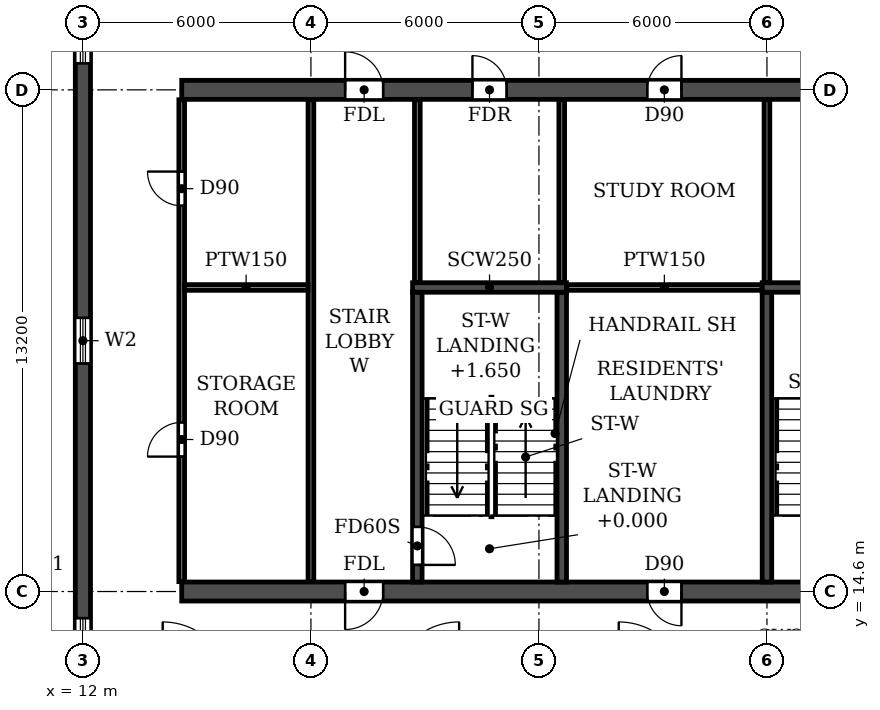
"""IFC4 building model, lengths in metres.
Left out: names, types, materials, properties, quantities, classifications, styles, units other than length and angle.
Written with IfcOpenShell. Run it as: python <this file> out.ifc"""

import sys

from ifc_helpers import new_model, si_unit, direction, frame, frame_2d, origin, place, context, subcontext, project, spatial, rectangle, extrude, element, fill, save


model = new_model("IFC4")
c1 = context("Model", 3, precision=1e-05, world=origin(), true_north=direction((0.0, 1.0)))
c2 = subcontext(c1, "Body", "Model", "MODEL_VIEW")
j1 = project(units=[si_unit("LENGTHUNIT", "METRE"), si_unit("PLANEANGLEUNIT", "RADIAN")], contexts=[c1])
p1 = place(None, origin())
s1 = spatial("IfcSite", under=j1, at=p1, CompositionType="ELEMENT")
p2 = place(p1, origin())
s2 = spatial("IfcBuilding", under=s1, at=p2, CompositionType="ELEMENT")
p3 = place(p2, frame((0.0, 0.0, 105.9)))
s3 = spatial("IfcBuildingStorey", under=s2, at=p3, CompositionType="ELEMENT", Elevation=105.9)
p4 = place(p3, frame((12.0, 4.683, 0.0), z_axis=(0.0, 0.0, 1.0), x_axis=(0.0, 1.0, 0.0)))
e1 = element("IfcWall", 1, at=p4, inside=s3, PredefinedType="SHEAR", context=c2, shape_type="SweptSolid", body=[
    extrude(rectangle(XDim=34.234, YDim=0.4, at=frame_2d((17.117, 0.0))), origin(), (0.0, 0.0, 1.0), 3.06),
])
p5 = place(p4, frame((23.817, 0.0, 0.9)))
e2 = element("IfcOpeningElement", 2, at=p5, cuts=e1, PredefinedType="OPENING", context=c2, shape_type="SweptSolid", body=[
    extrude(rectangle(XDim=1.2, YDim=1.5, at=frame_2d((0.6, 0.75))), frame((0.0, 0.21, 0.0), z_axis=(0.0, -1.0, 0.0), x_axis=(1.0, 0.0, 0.0)), (0.0, 0.0, 1.0), 0.42),
])
p6 = place(p4, frame((8.017, 0.0, 0.9)))
e3 = element("IfcOpeningElement", 3, at=p6, cuts=e1, PredefinedType="OPENING", context=c2, shape_type="SweptSolid", body=[
    extrude(rectangle(XDim=1.2, YDim=1.5, at=frame_2d((0.6, 0.75))), frame((0.0, 0.21, 0.0), z_axis=(0.0, -1.0, 0.0), x_axis=(1.0, 0.0, 0.0)), (0.0, 0.0, 1.0), 0.42),
])
p7 = place(p4, frame((15.917, 0.0, 0.9)))
e4 = element("IfcOpeningElement", 4, at=p7, cuts=e1, PredefinedType="OPENING", context=c2, shape_type="SweptSolid", body=[
    extrude(rectangle(XDim=1.2, YDim=1.5, at=frame_2d((0.6, 0.75))), frame((0.0, 0.21, 0.0), z_axis=(0.0, -1.0, 0.0), x_axis=(1.0, 0.0, 0.0)), (0.0, 0.0, 1.0), 0.42),
])
p8 = place(p4, frame((26.417, 0.0, 0.0)))
e5 = element("IfcOpeningElement", 5, at=p8, cuts=e1, PredefinedType="OPENING", context=c2, shape_type="SweptSolid", body=[
    extrude(rectangle(XDim=1.0, YDim=2.1, at=frame_2d((0.5, 1.05))), frame((0.0, 0.21, 0.0), z_axis=(0.0, -1.0, 0.0), x_axis=(1.0, 0.0, 0.0)), (0.0, 0.0, 1.0), 0.42),
])
p9 = place(p4, frame((3.159, 0.0, 0.0)))
e6 = element("IfcOpeningElement", 6, at=p9, cuts=e1, PredefinedType="OPENING", context=c2, shape_type="SweptSolid", body=[
    extrude(rectangle(XDim=1.0, YDim=2.1, at=frame_2d((0.5, 1.05))), frame((0.0, 0.21, 0.0), z_axis=(0.0, -1.0, 0.0), x_axis=(1.0, 0.0, 0.0)), (0.0, 0.0, 1.0), 0.42),
])
p10 = place(p3, frame((14.6, 14.6, 0.0), z_axis=(0.0, 0.0, 1.0), x_axis=(1.0, 0.0, 0.0)))
e7 = element("IfcWall", 7, at=p10, inside=s3, PredefinedType="SOLIDWALL", context=c2, shape_type="SweptSolid", body=[
    extrude(rectangle(XDim=72.8, YDim=0.5, at=frame_2d((36.4, 0.0))), origin(), (0.0, 0.0, 1.0), 3.06),
])
p11 = place(p10, frame((4.3, 0.0, 0.0)))
e8 = element("IfcOpeningElement", 8, at=p11, cuts=e7, PredefinedType="OPENING", context=c2, shape_type="SweptSolid", body=[
    extrude(rectangle(XDim=1.0, YDim=2.1, at=frame_2d((0.5, 1.05))), frame((0.0, 0.26, 0.0), z_axis=(0.0, -1.0, 0.0), x_axis=(1.0, 0.0, 0.0)), (0.0, 0.0, 1.0), 0.52),
])
p12 = place(p10, frame((12.25, 0.0, 0.0)))
e9 = element("IfcOpeningElement", 9, at=p12, cuts=e7, PredefinedType="OPENING", context=c2, shape_type="SweptSolid", body=[
    extrude(rectangle(XDim=0.9, YDim=2.1, at=frame_2d((0.45, 1.05))), frame((0.0, 0.26, 0.0), z_axis=(0.0, -1.0, 0.0), x_axis=(1.0, 0.0, 0.0)), (0.0, 0.0, 1.0), 0.52),
])
p13 = place(p10, frame((16.8, 0.0, 0.0)))
e10 = element("IfcOpeningElement", 10, at=p13, cuts=e7, PredefinedType="OPENING", context=c2, shape_type="SweptSolid", body=[
    extrude(rectangle(XDim=1.0, YDim=2.1, at=frame_2d((0.5, 1.05))), frame((0.0, 0.26, 0.0), z_axis=(0.0, -1.0, 0.0), x_axis=(1.0, 0.0, 0.0)), (0.0, 0.0, 1.0), 0.52),
])
p14 = place(p10, frame((30.7, 0.0, 0.0)))
e11 = element("IfcOpeningElement", 11, at=p14, cuts=e7, PredefinedType="OPENING", context=c2, shape_type="SweptSolid", body=[
    extrude(rectangle(XDim=1.0, YDim=2.1, at=frame_2d((0.5, 1.05))), frame((0.0, 0.26, 0.0), z_axis=(0.0, -1.0, 0.0), x_axis=(1.0, 0.0, 0.0)), (0.0, 0.0, 1.0), 0.52),
])
p15 = place(p10, frame((35.9, 0.0, 0.0)))
e12 = element("IfcOpeningElement", 12, at=p15, cuts=e7, PredefinedType="OPENING", context=c2, shape_type="SweptSolid", body=[
    extrude(rectangle(XDim=1.0, YDim=2.1, at=frame_2d((0.5, 1.05))), frame((0.0, 0.26, 0.0), z_axis=(0.0, -1.0, 0.0), x_axis=(1.0, 0.0, 0.0)), (0.0, 0.0, 1.0), 0.52),
])
p16 = place(p10, frame((39.8, 0.0, 0.0)))
e13 = element("IfcOpeningElement", 13, at=p16, cuts=e7, PredefinedType="OPENING", context=c2, shape_type="SweptSolid", body=[
    extrude(rectangle(XDim=1.0, YDim=2.1, at=frame_2d((0.5, 1.05))), frame((0.0, 0.26, 0.0), z_axis=(0.0, -1.0, 0.0), x_axis=(1.0, 0.0, 0.0)), (0.0, 0.0, 1.0), 0.52),
])
p17 = place(p10, frame((43.7, 0.0, 0.0)))
e14 = element("IfcOpeningElement", 14, at=p17, cuts=e7, PredefinedType="OPENING", context=c2, shape_type="SweptSolid", body=[
    extrude(rectangle(XDim=1.0, YDim=2.1, at=frame_2d((0.5, 1.05))), frame((0.0, 0.26, 0.0), z_axis=(0.0, -1.0, 0.0), x_axis=(1.0, 0.0, 0.0)), (0.0, 0.0, 1.0), 0.52),
])
p18 = place(p10, frame((55.0, 0.0, 0.0)))
e15 = element("IfcOpeningElement", 15, at=p18, cuts=e7, PredefinedType="OPENING", context=c2, shape_type="SweptSolid", body=[
    extrude(rectangle(XDim=1.0, YDim=2.1, at=frame_2d((0.5, 1.05))), frame((0.0, 0.26, 0.0), z_axis=(0.0, -1.0, 0.0), x_axis=(1.0, 0.0, 0.0)), (0.0, 0.0, 1.0), 0.52),
])
p19 = place(p10, frame((59.65, 0.0, 0.0)))
e16 = element("IfcOpeningElement", 16, at=p19, cuts=e7, PredefinedType="OPENING", context=c2, shape_type="SweptSolid", body=[
    extrude(rectangle(XDim=0.9, YDim=2.1, at=frame_2d((0.45, 1.05))), frame((0.0, 0.26, 0.0), z_axis=(0.0, -1.0, 0.0), x_axis=(1.0, 0.0, 0.0)), (0.0, 0.0, 1.0), 0.52),
])
p20 = place(p10, frame((67.5, 0.0, 0.0)))
e17 = element("IfcOpeningElement", 17, at=p20, cuts=e7, PredefinedType="OPENING", context=c2, shape_type="SweptSolid", body=[
    extrude(rectangle(XDim=1.0, YDim=2.1, at=frame_2d((0.5, 1.05))), frame((0.0, 0.26, 0.0), z_axis=(0.0, -1.0, 0.0), x_axis=(1.0, 0.0, 0.0)), (0.0, 0.0, 1.0), 0.52),
])
p21 = place(p3, frame((14.6, 27.8, 0.0), z_axis=(0.0, 0.0, 1.0), x_axis=(1.0, 0.0, 0.0)))
e18 = element("IfcWall", 18, at=p21, inside=s3, PredefinedType="SOLIDWALL", context=c2, shape_type="SweptSolid", body=[
    extrude(rectangle(XDim=72.8, YDim=0.5, at=frame_2d((36.4, 0.0))), origin(), (0.0, 0.0, 1.0), 3.06),
])
p22 = place(p21, frame((4.3, 0.0, 0.0)))
e19 = element("IfcOpeningElement", 19, at=p22, cuts=e18, PredefinedType="OPENING", context=c2, shape_type="SweptSolid", body=[
    extrude(rectangle(XDim=1.0, YDim=2.1, at=frame_2d((0.5, 1.05))), frame((0.0, 0.26, 0.0), z_axis=(0.0, -1.0, 0.0), x_axis=(1.0, 0.0, 0.0)), (0.0, 0.0, 1.0), 0.52),
])
p23 = place(p21, frame((7.65, 0.0, 0.0)))
e20 = element("IfcOpeningElement", 20, at=p23, cuts=e18, PredefinedType="OPENING", context=c2, shape_type="SweptSolid", body=[
    extrude(rectangle(XDim=0.9, YDim=2.1, at=frame_2d((0.45, 1.05))), frame((0.0, 0.26, 0.0), z_axis=(0.0, -1.0, 0.0), x_axis=(1.0, 0.0, 0.0)), (0.0, 0.0, 1.0), 0.52),
])
p24 = place(p21, frame((12.25, 0.0, 0.0)))
e21 = element("IfcOpeningElement", 21, at=p24, cuts=e18, PredefinedType="OPENING", context=c2, shape_type="SweptSolid", body=[
    extrude(rectangle(XDim=0.9, YDim=2.1, at=frame_2d((0.45, 1.05))), frame((0.0, 0.26, 0.0), z_axis=(0.0, -1.0, 0.0), x_axis=(1.0, 0.0, 0.0)), (0.0, 0.0, 1.0), 0.52),
])
p25 = place(p21, frame((16.85, 0.0, 0.0)))
e22 = element("IfcOpeningElement", 22, at=p25, cuts=e18, PredefinedType="OPENING", context=c2, shape_type="SweptSolid", body=[
    extrude(rectangle(XDim=0.9, YDim=2.1, at=frame_2d((0.45, 1.05))), frame((0.0, 0.26, 0.0), z_axis=(0.0, -1.0, 0.0), x_axis=(1.0, 0.0, 0.0)), (0.0, 0.0, 1.0), 0.52),
])
p26 = place(p21, frame((21.3, 0.0, 0.0)))
e23 = element("IfcOpeningElement", 23, at=p26, cuts=e18, PredefinedType="OPENING", context=c2, shape_type="SweptSolid", body=[
    extrude(rectangle(XDim=1.0, YDim=2.1, at=frame_2d((0.5, 1.05))), frame((0.0, 0.26, 0.0), z_axis=(0.0, -1.0, 0.0), x_axis=(1.0, 0.0, 0.0)), (0.0, 0.0, 1.0), 0.52),
])
p27 = place(p21, frame((26.25, 0.0, 0.0)))
e24 = element("IfcOpeningElement", 24, at=p27, cuts=e18, PredefinedType="OPENING", context=c2, shape_type="SweptSolid", body=[
    extrude(rectangle(XDim=1.5, YDim=2.1, at=frame_2d((0.75, 1.05))), frame((0.0, 0.26, 0.0), z_axis=(0.0, -1.0, 0.0), x_axis=(1.0, 0.0, 0.0)), (0.0, 0.0, 1.0), 0.52),
])
p28 = place(p21, frame((33.0, 0.0, 0.0)))
e25 = element("IfcOpeningElement", 25, at=p28, cuts=e18, PredefinedType="OPENING", context=c2, shape_type="SweptSolid", body=[
    extrude(rectangle(XDim=1.0, YDim=2.1, at=frame_2d((0.5, 1.05))), frame((0.0, 0.26, 0.0), z_axis=(0.0, -1.0, 0.0), x_axis=(1.0, 0.0, 0.0)), (0.0, 0.0, 1.0), 0.52),
])
p29 = place(p21, frame((35.9, 0.0, 0.0)))
e26 = element("IfcOpeningElement", 26, at=p29, cuts=e18, PredefinedType="OPENING", context=c2, shape_type="SweptSolid", body=[
    extrude(rectangle(XDim=1.0, YDim=2.1, at=frame_2d((0.5, 1.05))), frame((0.0, 0.26, 0.0), z_axis=(0.0, -1.0, 0.0), x_axis=(1.0, 0.0, 0.0)), (0.0, 0.0, 1.0), 0.52),
])
p30 = place(p21, frame((40.1, 0.0, 0.0)))
e27 = element("IfcOpeningElement", 27, at=p30, cuts=e18, PredefinedType="OPENING", context=c2, shape_type="SweptSolid", body=[
    extrude(rectangle(XDim=1.0, YDim=2.1, at=frame_2d((0.5, 1.05))), frame((0.0, 0.26, 0.0), z_axis=(0.0, -1.0, 0.0), x_axis=(1.0, 0.0, 0.0)), (0.0, 0.0, 1.0), 0.52),
])
p31 = place(p21, frame((44.0, 0.0, 0.0)))
e28 = element("IfcOpeningElement", 28, at=p31, cuts=e18, PredefinedType="OPENING", context=c2, shape_type="SweptSolid", body=[
    extrude(rectangle(XDim=1.0, YDim=2.1, at=frame_2d((0.5, 1.05))), frame((0.0, 0.26, 0.0), z_axis=(0.0, -1.0, 0.0), x_axis=(1.0, 0.0, 0.0)), (0.0, 0.0, 1.0), 0.52),
])
p32 = place(p21, frame((49.2, 0.0, 0.0)))
e29 = element("IfcOpeningElement", 29, at=p32, cuts=e18, PredefinedType="OPENING", context=c2, shape_type="SweptSolid", body=[
    extrude(rectangle(XDim=1.0, YDim=2.1, at=frame_2d((0.5, 1.05))), frame((0.0, 0.26, 0.0), z_axis=(0.0, -1.0, 0.0), x_axis=(1.0, 0.0, 0.0)), (0.0, 0.0, 1.0), 0.52),
])
p33 = place(p21, frame((55.05, 0.0, 0.0)))
e30 = element("IfcOpeningElement", 30, at=p33, cuts=e18, PredefinedType="OPENING", context=c2, shape_type="SweptSolid", body=[
    extrude(rectangle(XDim=0.9, YDim=2.1, at=frame_2d((0.45, 1.05))), frame((0.0, 0.26, 0.0), z_axis=(0.0, -1.0, 0.0), x_axis=(1.0, 0.0, 0.0)), (0.0, 0.0, 1.0), 0.52),
])
p34 = place(p21, frame((59.65, 0.0, 0.0)))
e31 = element("IfcOpeningElement", 31, at=p34, cuts=e18, PredefinedType="OPENING", context=c2, shape_type="SweptSolid", body=[
    extrude(rectangle(XDim=0.9, YDim=2.1, at=frame_2d((0.45, 1.05))), frame((0.0, 0.26, 0.0), z_axis=(0.0, -1.0, 0.0), x_axis=(1.0, 0.0, 0.0)), (0.0, 0.0, 1.0), 0.52),
])
p35 = place(p21, frame((64.25, 0.0, 0.0)))
e32 = element("IfcOpeningElement", 32, at=p35, cuts=e18, PredefinedType="OPENING", context=c2, shape_type="SweptSolid", body=[
    extrude(rectangle(XDim=0.9, YDim=2.1, at=frame_2d((0.45, 1.05))), frame((0.0, 0.26, 0.0), z_axis=(0.0, -1.0, 0.0), x_axis=(1.0, 0.0, 0.0)), (0.0, 0.0, 1.0), 0.52),
])
p36 = place(p21, frame((67.5, 0.0, 0.0)))
e33 = element("IfcOpeningElement", 33, at=p36, cuts=e18, PredefinedType="OPENING", context=c2, shape_type="SweptSolid", body=[
    extrude(rectangle(XDim=1.0, YDim=2.1, at=frame_2d((0.5, 1.05))), frame((0.0, 0.26, 0.0), z_axis=(0.0, -1.0, 0.0), x_axis=(1.0, 0.0, 0.0)), (0.0, 0.0, 1.0), 0.52),
])
p37 = place(p3, frame((30.0, 14.85, 0.0), z_axis=(0.0, 0.0, 1.0), x_axis=(0.0, 1.0, 0.0)))
e34 = element("IfcWall", 34, at=p37, inside=s3, PredefinedType="SOLIDWALL", context=c2, shape_type="SweptSolid", body=[
    extrude(rectangle(XDim=7.625, YDim=0.25, at=frame_2d((3.812, 0.0))), origin(), (0.0, 0.0, 1.0), 3.06),
])
p38 = place(p3, frame((29.875, 22.6, 0.0), z_axis=(0.0, 0.0, 1.0), x_axis=(1.0, 0.0, 0.0)))
e35 = element("IfcWall", 35, at=p38, inside=s3, PredefinedType="SOLIDWALL", context=c2, shape_type="SweptSolid", body=[
    extrude(rectangle(XDim=4.05, YDim=0.25, at=frame_2d((2.025, 0.0))), origin(), (0.0, 0.0, 1.0), 3.06),
])
p39 = place(p3, frame((20.8, 14.85, 0.0), z_axis=(0.0, 0.0, 1.0), x_axis=(0.0, 1.0, 0.0)))
e36 = element("IfcWall", 36, at=p39, inside=s3, PredefinedType="SOLIDWALL", context=c2, shape_type="SweptSolid", body=[
    extrude(rectangle(XDim=7.625, YDim=0.25, at=frame_2d((3.812, 0.0))), origin(), (0.0, 0.0, 1.0), 3.06),
])
p40 = place(p39, frame((0.45, 0.0, 0.0)))
e37 = element("IfcOpeningElement", 37, at=p40, cuts=e36, PredefinedType="OPENING", context=c2, shape_type="SweptSolid", body=[
    extrude(rectangle(XDim=1.0, YDim=2.1, at=frame_2d((0.5, 1.05))), frame((0.0, 0.135, 0.0), z_axis=(0.0, -1.0, 0.0), x_axis=(1.0, 0.0, 0.0)), (0.0, 0.0, 1.0), 0.27),
])
p41 = place(p3, frame((24.6, 14.85, 0.0), z_axis=(0.0, 0.0, 1.0), x_axis=(0.0, 1.0, 0.0)))
e38 = element("IfcWall", 38, at=p41, inside=s3, PredefinedType="SOLIDWALL", context=c2, shape_type="SweptSolid", body=[
    extrude(rectangle(XDim=7.625, YDim=0.25, at=frame_2d((3.812, 0.0))), origin(), (0.0, 0.0, 1.0), 3.06),
])
p42 = place(p3, frame((20.675, 22.6, 0.0), z_axis=(0.0, 0.0, 1.0), x_axis=(1.0, 0.0, 0.0)))
e39 = element("IfcWall", 39, at=p42, inside=s3, PredefinedType="SOLIDWALL", context=c2, shape_type="SweptSolid", body=[
    extrude(rectangle(XDim=4.05, YDim=0.25, at=frame_2d((2.025, 0.0))), origin(), (0.0, 0.0, 1.0), 3.06),
])
p43 = place(p3, frame((14.6, 14.86, 0.0), z_axis=(0.0, 0.0, 1.0), x_axis=(0.0, 1.0, 0.0)))
e40 = element("IfcWall", 40, at=p43, inside=s3, PredefinedType="PARTITIONING", context=c2, shape_type="SweptSolid", body=[
    extrude(rectangle(XDim=12.68, YDim=0.15, at=frame_2d((6.34, 0.0))), origin(), (0.0, 0.0, 1.0), 3.06),
])
p44 = place(p43, frame((3.29, 0.0, 0.0)))
e41 = element("IfcOpeningElement", 41, at=p44, cuts=e40, PredefinedType="OPENING", context=c2, shape_type="SweptSolid", body=[
    extrude(rectangle(XDim=0.9, YDim=2.1, at=frame_2d((0.45, 1.05))), frame((0.0, 0.085, 0.0), z_axis=(0.0, -1.0, 0.0), x_axis=(1.0, 0.0, 0.0)), (0.0, 0.0, 1.0), 0.17),
])
p45 = place(p43, frame((9.89, 0.0, 0.0)))
e42 = element("IfcOpeningElement", 42, at=p45, cuts=e40, PredefinedType="OPENING", context=c2, shape_type="SweptSolid", body=[
    extrude(rectangle(XDim=0.9, YDim=2.1, at=frame_2d((0.45, 1.05))), frame((0.0, 0.085, 0.0), z_axis=(0.0, -1.0, 0.0), x_axis=(1.0, 0.0, 0.0)), (0.0, 0.0, 1.0), 0.17),
])
p46 = place(p3, frame((18.0, 14.86, 0.0), z_axis=(0.0, 0.0, 1.0), x_axis=(0.0, 1.0, 0.0)))
e43 = element("IfcWall", 43, at=p46, inside=s3, PredefinedType="PARTITIONING", context=c2, shape_type="SweptSolid", body=[
    extrude(rectangle(XDim=12.68, YDim=0.15, at=frame_2d((6.34, 0.0))), origin(), (0.0, 0.0, 1.0), 3.06),
])
p47 = place(p3, frame((14.675, 22.6, 0.0), z_axis=(0.0, 0.0, 1.0), x_axis=(1.0, 0.0, 0.0)))
e44 = element("IfcWall", 44, at=p47, inside=s3, PredefinedType="PARTITIONING", context=c2, shape_type="SweptSolid", body=[
    extrude(rectangle(XDim=3.25, YDim=0.15, at=frame_2d((1.625, 0.0))), origin(), (0.0, 0.0, 1.0), 3.06),
])
p48 = place(p3, frame((24.735, 22.6, 0.0), z_axis=(0.0, 0.0, 1.0), x_axis=(1.0, 0.0, 0.0)))
e45 = element("IfcWall", 45, at=p48, inside=s3, PredefinedType="PARTITIONING", context=c2, shape_type="SweptSolid", body=[
    extrude(rectangle(XDim=5.13, YDim=0.15, at=frame_2d((2.565, 0.0))), origin(), (0.0, 0.0, 1.0), 3.06),
])
for number, where, z_axis, x_axis in (
    (46, (20.8, 22.735, 0.0), (0.0, 0.0, 1.0), (0.0, 1.0, 0.0)),
    (47, (24.6, 22.735, 0.0), (0.0, 0.0, 1.0), (0.0, 1.0, 0.0)),
    (48, (30.0, 22.735, 0.0), (0.0, 0.0, 1.0), (0.0, 1.0, 0.0)),
):
    element("IfcWall", number, at=place(p3, frame(where, z_axis=z_axis, x_axis=x_axis)), inside=s3, PredefinedType="PARTITIONING", context=c2, shape_type="SweptSolid", body=[
        extrude(rectangle(XDim=4.805, YDim=0.15, at=frame_2d((2.402, 0.0))), origin(), (0.0, 0.0, 1.0), 3.06),
    ])
p49 = place(p5, origin())
e49 = element("IfcWindow", 49, at=p49, inside=s3, PartitioningType="SINGLE_PANEL", PredefinedType="WINDOW", context=c2, shape_type="SweptSolid", body=[
    extrude(rectangle(XDim=1.2, YDim=1.5, at=frame_2d((0.6, 0.75))), frame((0.0, 0.03, 0.0), z_axis=(0.0, -1.0, 0.0), x_axis=(1.0, 0.0, 0.0)), (0.0, 0.0, 1.0), 0.06),
])
fill(e2, e49)
p50 = place(p6, origin())
e50 = element("IfcWindow", 50, at=p50, inside=s3, PartitioningType="SINGLE_PANEL", PredefinedType="WINDOW", context=c2, shape_type="SweptSolid", body=[
    extrude(rectangle(XDim=1.2, YDim=1.5, at=frame_2d((0.6, 0.75))), frame((0.0, 0.03, 0.0), z_axis=(0.0, -1.0, 0.0), x_axis=(1.0, 0.0, 0.0)), (0.0, 0.0, 1.0), 0.06),
])
fill(e3, e50)
p51 = place(p7, origin())
e51 = element("IfcWindow", 51, at=p51, inside=s3, PartitioningType="SINGLE_PANEL", PredefinedType="WINDOW", context=c2, shape_type="SweptSolid", body=[
    extrude(rectangle(XDim=1.2, YDim=1.5, at=frame_2d((0.6, 0.75))), frame((0.0, 0.03, 0.0), z_axis=(0.0, -1.0, 0.0), x_axis=(1.0, 0.0, 0.0)), (0.0, 0.0, 1.0), 0.06),
])
fill(e4, e51)
p52 = place(p22, origin())
e52 = element("IfcDoor", 52, at=p52, inside=s3, OperationType="SINGLE_SWING_LEFT", PredefinedType="DOOR", context=c2, shape_type="SweptSolid", body=[
    extrude(rectangle(XDim=1.0, YDim=2.1, at=frame_2d((0.5, 1.05))), frame((0.0, 0.025, 0.0), z_axis=(0.0, -1.0, 0.0), x_axis=(1.0, 0.0, 0.0)), (0.0, 0.0, 1.0), 0.05),
])
fill(e19, e52)
p53 = place(p23, origin())
e53 = element("IfcDoor", 53, at=p53, inside=s3, OperationType="SINGLE_SWING_LEFT", PredefinedType="DOOR", context=c2, shape_type="SweptSolid", body=[
    extrude(rectangle(XDim=0.9, YDim=2.1, at=frame_2d((0.45, 1.05))), frame((0.0, 0.025, 0.0), z_axis=(0.0, -1.0, 0.0), x_axis=(1.0, 0.0, 0.0)), (0.0, 0.0, 1.0), 0.05),
])
fill(e20, e53)
p54 = place(p24, origin())
e54 = element("IfcDoor", 54, at=p54, inside=s3, OperationType="SINGLE_SWING_RIGHT", PredefinedType="DOOR", context=c2, shape_type="SweptSolid", body=[
    extrude(rectangle(XDim=0.9, YDim=2.1, at=frame_2d((0.45, 1.05))), frame((0.0, 0.025, 0.0), z_axis=(0.0, -1.0, 0.0), x_axis=(1.0, 0.0, 0.0)), (0.0, 0.0, 1.0), 0.05),
])
fill(e21, e54)
p55 = place(p11, frame((1.0, 0.0, 0.0), z_axis=(0.0, 0.0, 1.0), x_axis=(-1.0, 0.0, 0.0)))
e55 = element("IfcDoor", 55, at=p55, inside=s3, OperationType="SINGLE_SWING_RIGHT", PredefinedType="DOOR", context=c2, shape_type="SweptSolid", body=[
    extrude(rectangle(XDim=1.0, YDim=2.1, at=frame_2d((0.5, 1.05))), frame((0.0, 0.025, 0.0), z_axis=(0.0, -1.0, 0.0), x_axis=(1.0, 0.0, 0.0)), (0.0, 0.0, 1.0), 0.05),
])
fill(e8, e55)
p56 = place(p12, frame((0.9, 0.0, 0.0), z_axis=(0.0, 0.0, 1.0), x_axis=(-1.0, 0.0, 0.0)))
e56 = element("IfcDoor", 56, at=p56, inside=s3, OperationType="SINGLE_SWING_LEFT", PredefinedType="DOOR", context=c2, shape_type="SweptSolid", body=[
    extrude(rectangle(XDim=0.9, YDim=2.1, at=frame_2d((0.45, 1.05))), frame((0.0, 0.025, 0.0), z_axis=(0.0, -1.0, 0.0), x_axis=(1.0, 0.0, 0.0)), (0.0, 0.0, 1.0), 0.05),
])
fill(e9, e56)
p57 = place(p44, origin())
e57 = element("IfcDoor", 57, at=p57, inside=s3, OperationType="SINGLE_SWING_LEFT", PredefinedType="DOOR", context=c2, shape_type="SweptSolid", body=[
    extrude(rectangle(XDim=0.9, YDim=2.1, at=frame_2d((0.45, 1.05))), frame((0.0, 0.025, 0.0), z_axis=(0.0, -1.0, 0.0), x_axis=(1.0, 0.0, 0.0)), (0.0, 0.0, 1.0), 0.05),
])
fill(e41, e57)
p58 = place(p45, origin())
e58 = element("IfcDoor", 58, at=p58, inside=s3, OperationType="SINGLE_SWING_RIGHT", PredefinedType="DOOR", context=c2, shape_type="SweptSolid", body=[
    extrude(rectangle(XDim=0.9, YDim=2.1, at=frame_2d((0.45, 1.05))), frame((0.0, 0.025, 0.0), z_axis=(0.0, -1.0, 0.0), x_axis=(1.0, 0.0, 0.0)), (0.0, 0.0, 1.0), 0.05),
])
fill(e42, e58)
p59 = place(p40, frame((1.0, 0.0, 0.0), z_axis=(0.0, 0.0, 1.0), x_axis=(-1.0, 0.0, 0.0)))
e59 = element("IfcDoor", 59, at=p59, inside=s3, OperationType="SINGLE_SWING_RIGHT", PredefinedType="DOOR", context=c2, shape_type="SweptSolid", body=[
    extrude(rectangle(XDim=1.0, YDim=2.1, at=frame_2d((0.5, 1.05))), frame((0.0, 0.025, 0.0), z_axis=(0.0, -1.0, 0.0), x_axis=(1.0, 0.0, 0.0)), (0.0, 0.0, 1.0), 0.05),
])
fill(e37, e59)
save(model, sys.argv[1])
